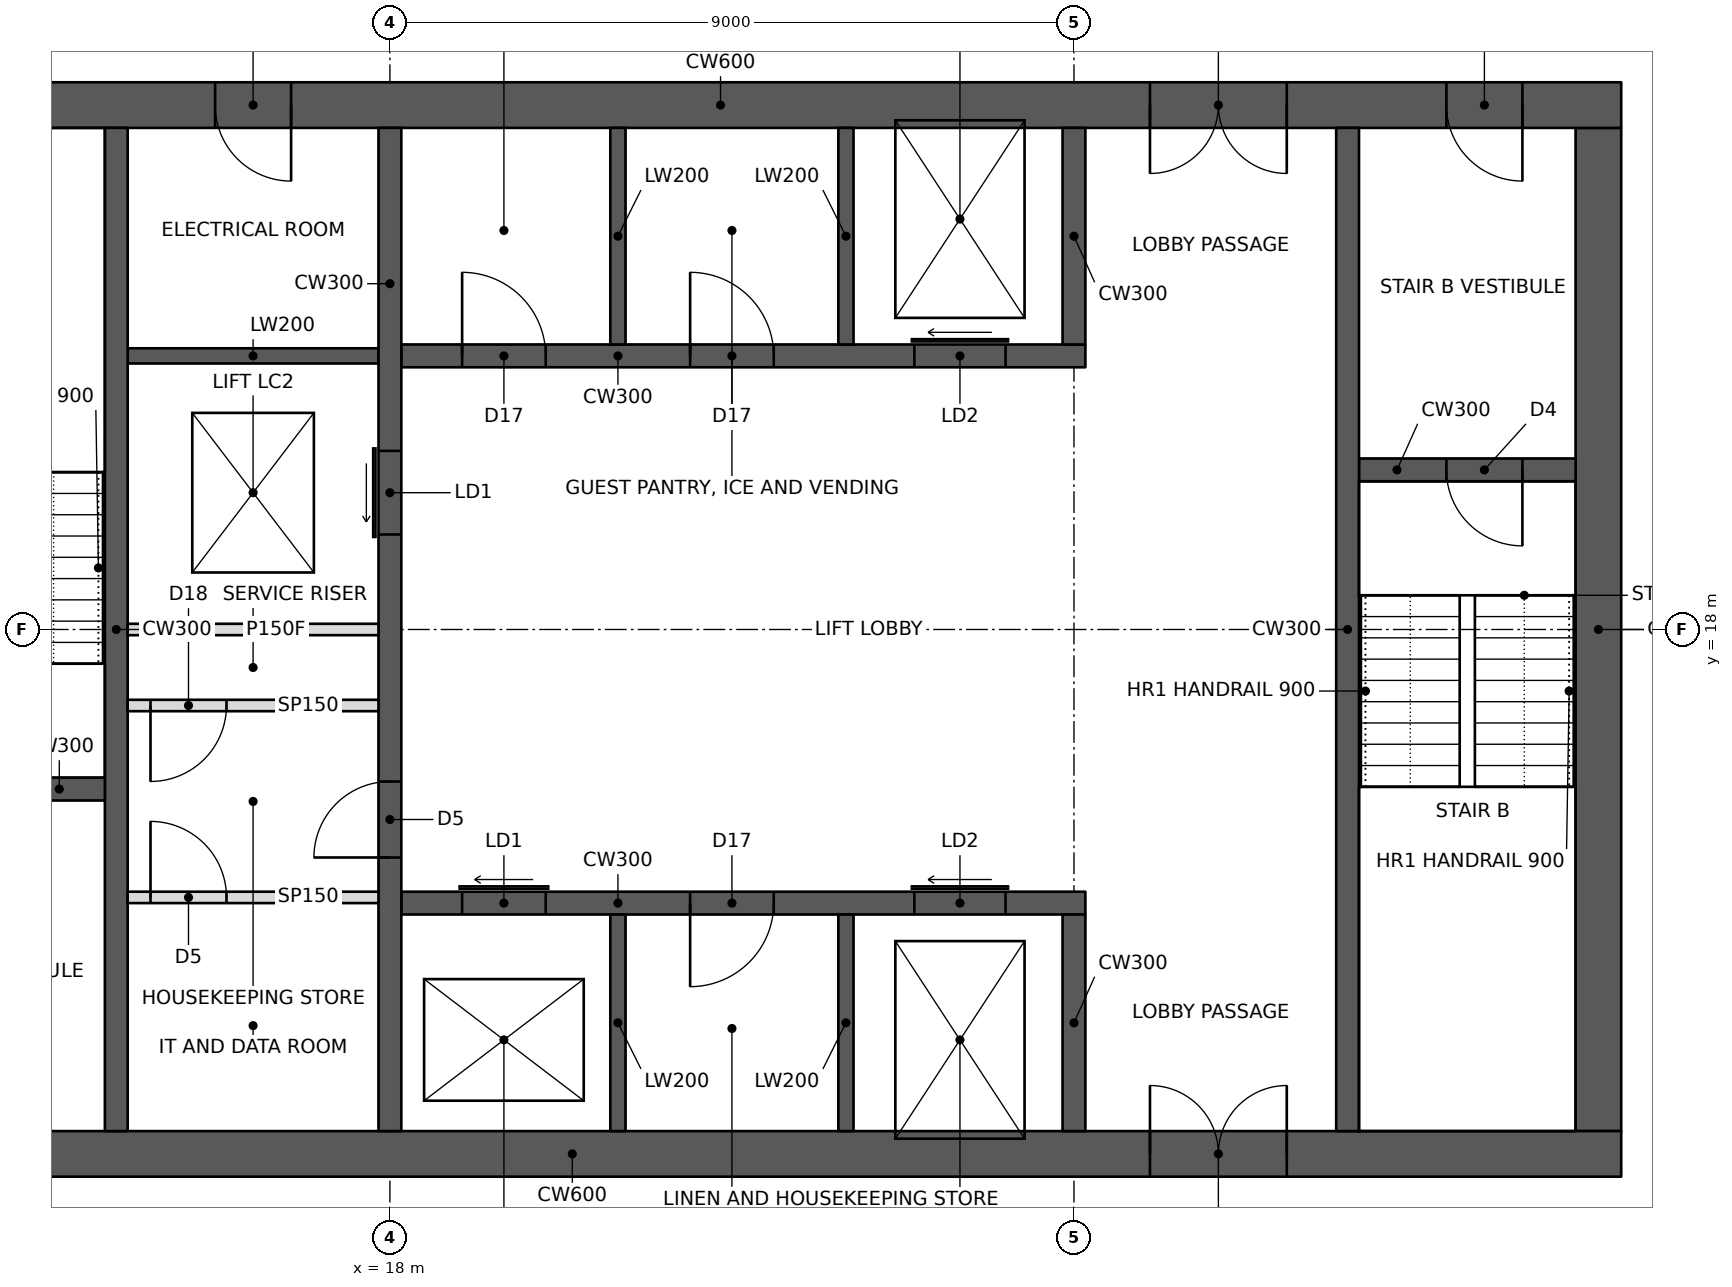
"""IFC4 building model, lengths in metres.
Left out: names, types, materials, properties, quantities, classifications, styles, units other than length and angle.
Written with IfcOpenShell. Run it as: python <this file> out.ifc"""

import sys

from ifc_helpers import new_model, si_unit, direction, frame, frame_2d, origin, place, context, subcontext, project, spatial, rectangle, extrude, element, fill, save


model = new_model("IFC4")
c1 = context("Model", 3, precision=1e-05, world=origin(), true_north=direction((0.0, 1.0)))
c2 = subcontext(c1, "Body", "Model", "MODEL_VIEW")
j1 = project(units=[si_unit("LENGTHUNIT", "METRE"), si_unit("PLANEANGLEUNIT", "RADIAN")], contexts=[c1])
p1 = place(None, origin())
s1 = spatial("IfcSite", under=j1, at=p1, CompositionType="ELEMENT")
p2 = place(p1, origin())
s2 = spatial("IfcBuilding", under=s1, at=p2, CompositionType="ELEMENT")
p3 = place(p2, frame((0.0, 0.0, 197.8)))
s3 = spatial("IfcBuildingStorey", under=s2, at=p3, CompositionType="ELEMENT", Elevation=197.8)
p4 = place(p3, frame((10.8, 11.1, 0.0), z_axis=(0.0, 0.0, 1.0), x_axis=(1.0, 0.0, 0.0)))
e1 = element("IfcWall", 1, at=p4, inside=s3, PredefinedType="SHEAR", context=c2, shape_type="SweptSolid", body=[
    extrude(rectangle(XDim=23.4, YDim=0.6, at=frame_2d((11.7, 0.0))), origin(), (0.0, 0.0, 1.0), 3.4),
])
p5 = place(p4, frame((1.0, 0.0, 0.0)))
e2 = element("IfcOpeningElement", 2, at=p5, cuts=e1, PredefinedType="OPENING", context=c2, shape_type="SweptSolid", body=[
    extrude(rectangle(XDim=1.0, YDim=2.1, at=frame_2d((0.5, 1.05))), frame((0.0, 0.31, 0.0), z_axis=(0.0, -1.0, 0.0), x_axis=(1.0, 0.0, 0.0)), (0.0, 0.0, 1.0), 0.62),
])
p6 = place(p4, frame((17.2, 0.0, 0.0)))
e3 = element("IfcOpeningElement", 3, at=p6, cuts=e1, PredefinedType="OPENING", context=c2, shape_type="SweptSolid", body=[
    extrude(rectangle(XDim=1.8, YDim=2.1, at=frame_2d((0.9, 1.05))), frame((0.0, 0.31, 0.0), z_axis=(0.0, -1.0, 0.0), x_axis=(1.0, 0.0, 0.0)), (0.0, 0.0, 1.0), 0.62),
])
p7 = place(p3, frame((10.8, 24.9, 0.0), z_axis=(0.0, 0.0, 1.0), x_axis=(1.0, 0.0, 0.0)))
e4 = element("IfcWall", 4, at=p7, inside=s3, PredefinedType="SHEAR", context=c2, shape_type="SweptSolid", body=[
    extrude(rectangle(XDim=23.4, YDim=0.6, at=frame_2d((11.7, 0.0))), origin(), (0.0, 0.0, 1.0), 3.4),
])
p8 = place(p7, frame((17.2, 0.0, 0.0)))
e5 = element("IfcOpeningElement", 5, at=p8, cuts=e4, PredefinedType="OPENING", context=c2, shape_type="SweptSolid", body=[
    extrude(rectangle(XDim=1.8, YDim=2.1, at=frame_2d((0.9, 1.05))), frame((0.0, 0.31, 0.0), z_axis=(0.0, -1.0, 0.0), x_axis=(1.0, 0.0, 0.0)), (0.0, 0.0, 1.0), 0.62),
])
p9 = place(p7, frame((21.1, 0.0, 0.0)))
e6 = element("IfcOpeningElement", 6, at=p9, cuts=e4, PredefinedType="OPENING", context=c2, shape_type="SweptSolid", body=[
    extrude(rectangle(XDim=1.0, YDim=2.1, at=frame_2d((0.5, 1.05))), frame((0.0, 0.31, 0.0), z_axis=(0.0, -1.0, 0.0), x_axis=(1.0, 0.0, 0.0)), (0.0, 0.0, 1.0), 0.62),
])
p10 = place(p7, frame((4.9, 0.0, 0.0)))
e7 = element("IfcOpeningElement", 7, at=p10, cuts=e4, PredefinedType="OPENING", context=c2, shape_type="SweptSolid", body=[
    extrude(rectangle(XDim=1.0, YDim=2.1, at=frame_2d((0.5, 1.05))), frame((0.0, 0.31, 0.0), z_axis=(0.0, -1.0, 0.0), x_axis=(1.0, 0.0, 0.0)), (0.0, 0.0, 1.0), 0.62),
])
p11 = place(p3, frame((33.9, 11.4, 0.0), z_axis=(0.0, 0.0, 1.0), x_axis=(0.0, 1.0, 0.0)))
e8 = element("IfcWall", 8, at=p11, inside=s3, PredefinedType="SHEAR", context=c2, shape_type="SweptSolid", body=[
    extrude(rectangle(XDim=13.2, YDim=0.6, at=frame_2d((6.6, 0.0))), origin(), (0.0, 0.0, 1.0), 3.4),
])
p12 = place(p3, frame((14.4, 11.4, 0.0), z_axis=(0.0, 0.0, 1.0), x_axis=(0.0, 1.0, 0.0)))
e9 = element("IfcWall", 9, at=p12, inside=s3, PredefinedType="SHEAR", context=c2, shape_type="SweptSolid", body=[
    extrude(rectangle(XDim=13.2, YDim=0.3, at=frame_2d((6.6, 0.0))), origin(), (0.0, 0.0, 1.0), 3.4),
])
p13 = place(p3, frame((11.4, 15.9, 0.0), z_axis=(0.0, 0.0, 1.0), x_axis=(1.0, 0.0, 0.0)))
e10 = element("IfcWall", 10, at=p13, inside=s3, PredefinedType="SHEAR", context=c2, shape_type="SweptSolid", body=[
    extrude(rectangle(XDim=2.85, YDim=0.3, at=frame_2d((1.425, 0.0))), origin(), (0.0, 0.0, 1.0), 3.4),
])
p14 = place(p13, frame((0.5, 0.0, 0.0)))
e11 = element("IfcOpeningElement", 11, at=p14, cuts=e10, PredefinedType="OPENING", context=c2, shape_type="SweptSolid", body=[
    extrude(rectangle(XDim=1.0, YDim=2.1, at=frame_2d((0.5, 1.05))), frame((0.0, 0.16, 0.0), z_axis=(0.0, -1.0, 0.0), x_axis=(1.0, 0.0, 0.0)), (0.0, 0.0, 1.0), 0.32),
])
p15 = place(p3, frame((18.0, 11.4, 0.0), z_axis=(0.0, 0.0, 1.0), x_axis=(0.0, 1.0, 0.0)))
e12 = element("IfcWall", 12, at=p15, inside=s3, PredefinedType="SHEAR", context=c2, shape_type="SweptSolid", body=[
    extrude(rectangle(XDim=13.2, YDim=0.3, at=frame_2d((6.6, 0.0))), origin(), (0.0, 0.0, 1.0), 3.4),
])
p16 = place(p15, frame((3.6, 0.0, 0.0)))
e13 = element("IfcOpeningElement", 13, at=p16, cuts=e12, PredefinedType="OPENING", context=c2, shape_type="SweptSolid", body=[
    extrude(rectangle(XDim=1.0, YDim=2.1, at=frame_2d((0.5, 1.05))), frame((0.0, 0.16, 0.0), z_axis=(0.0, -1.0, 0.0), x_axis=(1.0, 0.0, 0.0)), (0.0, 0.0, 1.0), 0.32),
])
p17 = place(p15, frame((7.85, 0.0, 0.0)))
e14 = element("IfcOpeningElement", 14, at=p17, cuts=e12, PredefinedType="OPENING", context=c2, shape_type="SweptSolid", body=[
    extrude(rectangle(XDim=1.1, YDim=2.1, at=frame_2d((0.55, 1.05))), frame((0.0, 0.16, 0.0), z_axis=(0.0, -1.0, 0.0), x_axis=(1.0, 0.0, 0.0)), (0.0, 0.0, 1.0), 0.32),
])
p18 = place(p3, frame((14.55, 18.0, 0.0), z_axis=(0.0, 0.0, 1.0), x_axis=(1.0, 0.0, 0.0)))
e15 = element("IfcWall", 15, at=p18, inside=s3, PredefinedType="PARTITIONING", context=c2, shape_type="SweptSolid", body=[
    extrude(rectangle(XDim=3.3, YDim=0.15, at=frame_2d((1.65, 0.0))), origin(), (0.0, 0.0, 1.0), 3.2),
])
p19 = place(p3, frame((18.15, 14.4, 0.0), z_axis=(0.0, 0.0, 1.0), x_axis=(1.0, 0.0, 0.0)))
e16 = element("IfcWall", 16, at=p19, inside=s3, PredefinedType="SHEAR", context=c2, shape_type="SweptSolid", body=[
    extrude(rectangle(XDim=9.0, YDim=0.3, at=frame_2d((4.5, 0.0))), origin(), (0.0, 0.0, 1.0), 3.4),
])
p20 = place(p19, frame((0.8, 0.0, 0.0)))
e17 = element("IfcOpeningElement", 17, at=p20, cuts=e16, PredefinedType="OPENING", context=c2, shape_type="SweptSolid", body=[
    extrude(rectangle(XDim=1.1, YDim=2.1, at=frame_2d((0.55, 1.05))), frame((0.0, 0.16, 0.0), z_axis=(0.0, -1.0, 0.0), x_axis=(1.0, 0.0, 0.0)), (0.0, 0.0, 1.0), 0.32),
])
p21 = place(p19, frame((6.75, 0.0, 0.0)))
e18 = element("IfcOpeningElement", 18, at=p21, cuts=e16, PredefinedType="OPENING", context=c2, shape_type="SweptSolid", body=[
    extrude(rectangle(XDim=1.2, YDim=2.1, at=frame_2d((0.6, 1.05))), frame((0.0, 0.16, 0.0), z_axis=(0.0, -1.0, 0.0), x_axis=(1.0, 0.0, 0.0)), (0.0, 0.0, 1.0), 0.32),
])
p22 = place(p19, frame((3.8, 0.0, 0.0)))
e19 = element("IfcOpeningElement", 19, at=p22, cuts=e16, PredefinedType="OPENING", context=c2, shape_type="SweptSolid", body=[
    extrude(rectangle(XDim=1.1, YDim=2.1, at=frame_2d((0.55, 1.05))), frame((0.0, 0.16, 0.0), z_axis=(0.0, -1.0, 0.0), x_axis=(1.0, 0.0, 0.0)), (0.0, 0.0, 1.0), 0.32),
])
p23 = place(p3, frame((27.0, 11.4, 0.0), z_axis=(0.0, 0.0, 1.0), x_axis=(0.0, 1.0, 0.0)))
e20 = element("IfcWall", 20, at=p23, inside=s3, PredefinedType="SHEAR", context=c2, shape_type="SweptSolid", body=[
    extrude(rectangle(XDim=2.85, YDim=0.3, at=frame_2d((1.425, 0.0))), origin(), (0.0, 0.0, 1.0), 3.4),
])
for number, where, z_axis, x_axis in (
    (21, (21.0, 11.4, 0.0), (0.0, 0.0, 1.0), (0.0, 1.0, 0.0)),
    (22, (24.0, 11.4, 0.0), (0.0, 0.0, 1.0), (0.0, 1.0, 0.0)),
):
    element("IfcWall", number, at=place(p3, frame(where, z_axis=z_axis, x_axis=x_axis)), inside=s3, PredefinedType="SHEAR", context=c2, shape_type="SweptSolid", body=[
        extrude(rectangle(XDim=2.85, YDim=0.2, at=frame_2d((1.425, 0.0))), origin(), (0.0, 0.0, 1.0), 3.4),
    ])
p24 = place(p3, frame((18.15, 21.6, 0.0), z_axis=(0.0, 0.0, 1.0), x_axis=(1.0, 0.0, 0.0)))
e23 = element("IfcWall", 23, at=p24, inside=s3, PredefinedType="SHEAR", context=c2, shape_type="SweptSolid", body=[
    extrude(rectangle(XDim=9.0, YDim=0.3, at=frame_2d((4.5, 0.0))), origin(), (0.0, 0.0, 1.0), 3.4),
])
p25 = place(p24, frame((6.75, 0.0, 0.0)))
e24 = element("IfcOpeningElement", 24, at=p25, cuts=e23, PredefinedType="OPENING", context=c2, shape_type="SweptSolid", body=[
    extrude(rectangle(XDim=1.2, YDim=2.1, at=frame_2d((0.6, 1.05))), frame((0.0, 0.16, 0.0), z_axis=(0.0, -1.0, 0.0), x_axis=(1.0, 0.0, 0.0)), (0.0, 0.0, 1.0), 0.32),
])
p26 = place(p24, frame((0.8, 0.0, 0.0)))
e25 = element("IfcOpeningElement", 25, at=p26, cuts=e23, PredefinedType="OPENING", context=c2, shape_type="SweptSolid", body=[
    extrude(rectangle(XDim=1.1, YDim=2.1, at=frame_2d((0.55, 1.05))), frame((0.0, 0.16, 0.0), z_axis=(0.0, -1.0, 0.0), x_axis=(1.0, 0.0, 0.0)), (0.0, 0.0, 1.0), 0.32),
])
p27 = place(p24, frame((3.8, 0.0, 0.0)))
e26 = element("IfcOpeningElement", 26, at=p27, cuts=e23, PredefinedType="OPENING", context=c2, shape_type="SweptSolid", body=[
    extrude(rectangle(XDim=1.1, YDim=2.1, at=frame_2d((0.55, 1.05))), frame((0.0, 0.16, 0.0), z_axis=(0.0, -1.0, 0.0), x_axis=(1.0, 0.0, 0.0)), (0.0, 0.0, 1.0), 0.32),
])
p28 = place(p3, frame((27.0, 21.75, 0.0), z_axis=(0.0, 0.0, 1.0), x_axis=(0.0, 1.0, 0.0)))
e27 = element("IfcWall", 27, at=p28, inside=s3, PredefinedType="SHEAR", context=c2, shape_type="SweptSolid", body=[
    extrude(rectangle(XDim=2.85, YDim=0.3, at=frame_2d((1.425, 0.0))), origin(), (0.0, 0.0, 1.0), 3.4),
])
for number, where, z_axis, x_axis in (
    (28, (21.0, 21.75, 0.0), (0.0, 0.0, 1.0), (0.0, 1.0, 0.0)),
    (29, (24.0, 21.75, 0.0), (0.0, 0.0, 1.0), (0.0, 1.0, 0.0)),
):
    element("IfcWall", number, at=place(p3, frame(where, z_axis=z_axis, x_axis=x_axis)), inside=s3, PredefinedType="SHEAR", context=c2, shape_type="SweptSolid", body=[
        extrude(rectangle(XDim=2.85, YDim=0.2, at=frame_2d((1.425, 0.0))), origin(), (0.0, 0.0, 1.0), 3.4),
    ])
p29 = place(p3, frame((30.6, 11.4, 0.0), z_axis=(0.0, 0.0, 1.0), x_axis=(0.0, 1.0, 0.0)))
e30 = element("IfcWall", 30, at=p29, inside=s3, PredefinedType="SHEAR", context=c2, shape_type="SweptSolid", body=[
    extrude(rectangle(XDim=13.2, YDim=0.3, at=frame_2d((6.6, 0.0))), origin(), (0.0, 0.0, 1.0), 3.4),
])
p30 = place(p3, frame((30.75, 20.1, 0.0), z_axis=(0.0, 0.0, 1.0), x_axis=(1.0, 0.0, 0.0)))
e31 = element("IfcWall", 31, at=p30, inside=s3, PredefinedType="SHEAR", context=c2, shape_type="SweptSolid", body=[
    extrude(rectangle(XDim=2.85, YDim=0.3, at=frame_2d((1.425, 0.0))), origin(), (0.0, 0.0, 1.0), 3.4),
])
p31 = place(p30, frame((1.15, 0.0, 0.0)))
e32 = element("IfcOpeningElement", 32, at=p31, cuts=e31, PredefinedType="OPENING", context=c2, shape_type="SweptSolid", body=[
    extrude(rectangle(XDim=1.0, YDim=2.1, at=frame_2d((0.5, 1.05))), frame((0.0, 0.16, 0.0), z_axis=(0.0, -1.0, 0.0), x_axis=(1.0, 0.0, 0.0)), (0.0, 0.0, 1.0), 0.32),
])
p32 = place(p3, frame((14.55, 21.6, 0.0), z_axis=(0.0, 0.0, 1.0), x_axis=(1.0, 0.0, 0.0)))
e33 = element("IfcWall", 33, at=p32, inside=s3, PredefinedType="SHEAR", context=c2, shape_type="SweptSolid", body=[
    extrude(rectangle(XDim=3.3, YDim=0.2, at=frame_2d((1.65, 0.0))), origin(), (0.0, 0.0, 1.0), 3.4),
])
p33 = place(p3, frame((14.55, 17.0, 0.0), z_axis=(0.0, 0.0, 1.0), x_axis=(1.0, 0.0, 0.0)))
e34 = element("IfcWall", 34, at=p33, inside=s3, PredefinedType="PARTITIONING", context=c2, shape_type="SweptSolid", body=[
    extrude(rectangle(XDim=3.3, YDim=0.15, at=frame_2d((1.65, 0.0))), origin(), (0.0, 0.0, 1.0), 3.2),
])
p34 = place(p33, frame((0.3, 0.0, 0.0)))
e35 = element("IfcOpeningElement", 35, at=p34, cuts=e34, PredefinedType="OPENING", context=c2, shape_type="SweptSolid", body=[
    extrude(rectangle(XDim=1.0, YDim=2.1, at=frame_2d((0.5, 1.05))), frame((0.0, 0.085, 0.0), z_axis=(0.0, -1.0, 0.0), x_axis=(1.0, 0.0, 0.0)), (0.0, 0.0, 1.0), 0.17),
])
p35 = place(p3, frame((14.55, 14.475, 0.0), z_axis=(0.0, 0.0, 1.0), x_axis=(1.0, 0.0, 0.0)))
e36 = element("IfcWall", 36, at=p35, inside=s3, PredefinedType="PARTITIONING", context=c2, shape_type="SweptSolid", body=[
    extrude(rectangle(XDim=3.3, YDim=0.15, at=frame_2d((1.65, 0.0))), origin(), (0.0, 0.0, 1.0), 3.2),
])
p36 = place(p35, frame((0.3, 0.0, 0.0)))
e37 = element("IfcOpeningElement", 37, at=p36, cuts=e36, PredefinedType="OPENING", context=c2, shape_type="SweptSolid", body=[
    extrude(rectangle(XDim=1.0, YDim=2.1, at=frame_2d((0.5, 1.05))), frame((0.0, 0.085, 0.0), z_axis=(0.0, -1.0, 0.0), x_axis=(1.0, 0.0, 0.0)), (0.0, 0.0, 1.0), 0.17),
])
p37 = place(p34, frame((1.0, 0.0, 0.0), z_axis=(0.0, 0.0, 1.0), x_axis=(-1.0, 0.0, 0.0)))
e38 = element("IfcDoor", 38, at=p37, inside=s3, OperationType="SINGLE_SWING_RIGHT", PredefinedType="DOOR", context=c2, shape_type="SweptSolid", body=[
    extrude(rectangle(XDim=1.0, YDim=2.1, at=frame_2d((0.5, 1.05))), frame((0.0, 0.025, 0.0), z_axis=(0.0, -1.0, 0.0), x_axis=(1.0, 0.0, 0.0)), (0.0, 0.0, 1.0), 0.05),
])
fill(e35, e38)
p38 = place(p36, origin())
e39 = element("IfcDoor", 39, at=p38, inside=s3, OperationType="SINGLE_SWING_LEFT", PredefinedType="DOOR", context=c2, shape_type="SweptSolid", body=[
    extrude(rectangle(XDim=1.0, YDim=2.1, at=frame_2d((0.5, 1.05))), frame((0.0, 0.025, 0.0), z_axis=(0.0, -1.0, 0.0), x_axis=(1.0, 0.0, 0.0)), (0.0, 0.0, 1.0), 0.05),
])
fill(e37, e39)
p39 = place(p6, origin())
e40 = element("IfcDoor", 40, at=p39, inside=s3, OperationType="DOUBLE_DOOR_SINGLE_SWING", PredefinedType="DOOR", context=c2, shape_type="SweptSolid", body=[
    extrude(rectangle(XDim=1.8, YDim=2.1, at=frame_2d((0.9, 1.05))), frame((0.0, 0.025, 0.0), z_axis=(0.0, -1.0, 0.0), x_axis=(1.0, 0.0, 0.0)), (0.0, 0.0, 1.0), 0.05),
])
fill(e3, e40)
p40 = place(p8, frame((1.8, 0.0, 0.0), z_axis=(0.0, 0.0, 1.0), x_axis=(-1.0, 0.0, 0.0)))
e41 = element("IfcDoor", 41, at=p40, inside=s3, OperationType="DOUBLE_DOOR_SINGLE_SWING", PredefinedType="DOOR", context=c2, shape_type="SweptSolid", body=[
    extrude(rectangle(XDim=1.8, YDim=2.1, at=frame_2d((0.9, 1.05))), frame((0.0, 0.025, 0.0), z_axis=(0.0, -1.0, 0.0), x_axis=(1.0, 0.0, 0.0)), (0.0, 0.0, 1.0), 0.05),
])
fill(e5, e41)
p41 = place(p9, frame((1.0, 0.0, 0.0), z_axis=(0.0, 0.0, 1.0), x_axis=(-1.0, 0.0, 0.0)))
e42 = element("IfcDoor", 42, at=p41, inside=s3, OperationType="SINGLE_SWING_LEFT", PredefinedType="DOOR", context=c2, shape_type="SweptSolid", body=[
    extrude(rectangle(XDim=1.0, YDim=2.1, at=frame_2d((0.5, 1.05))), frame((0.0, 0.025, 0.0), z_axis=(0.0, -1.0, 0.0), x_axis=(1.0, 0.0, 0.0)), (0.0, 0.0, 1.0), 0.05),
])
fill(e6, e42)
p42 = place(p31, frame((1.0, 0.0, 0.0), z_axis=(0.0, 0.0, 1.0), x_axis=(-1.0, 0.0, 0.0)))
e43 = element("IfcDoor", 43, at=p42, inside=s3, OperationType="SINGLE_SWING_LEFT", PredefinedType="DOOR", context=c2, shape_type="SweptSolid", body=[
    extrude(rectangle(XDim=1.0, YDim=2.1, at=frame_2d((0.5, 1.05))), frame((0.0, 0.025, 0.0), z_axis=(0.0, -1.0, 0.0), x_axis=(1.0, 0.0, 0.0)), (0.0, 0.0, 1.0), 0.05),
])
fill(e32, e43)
p43 = place(p16, origin())
e44 = element("IfcDoor", 44, at=p43, inside=s3, OperationType="SINGLE_SWING_LEFT", PredefinedType="DOOR", context=c2, shape_type="SweptSolid", body=[
    extrude(rectangle(XDim=1.0, YDim=2.1, at=frame_2d((0.5, 1.05))), frame((0.0, 0.025, 0.0), z_axis=(0.0, -1.0, 0.0), x_axis=(1.0, 0.0, 0.0)), (0.0, 0.0, 1.0), 0.05),
])
fill(e13, e44)
p44 = place(p10, frame((1.0, 0.0, 0.0), z_axis=(0.0, 0.0, 1.0), x_axis=(-1.0, 0.0, 0.0)))
e45 = element("IfcDoor", 45, at=p44, inside=s3, OperationType="SINGLE_SWING_LEFT", PredefinedType="DOOR", context=c2, shape_type="SweptSolid", body=[
    extrude(rectangle(XDim=1.0, YDim=2.1, at=frame_2d((0.5, 1.05))), frame((0.0, 0.025, 0.0), z_axis=(0.0, -1.0, 0.0), x_axis=(1.0, 0.0, 0.0)), (0.0, 0.0, 1.0), 0.05),
])
fill(e7, e45)
p45 = place(p20, origin())
e46 = element("IfcDoor", 46, at=p45, inside=s3, OperationType="SLIDING_TO_LEFT", PredefinedType="DOOR", context=c2, shape_type="SweptSolid", body=[
    extrude(rectangle(XDim=1.1, YDim=2.1, at=frame_2d((0.55, 1.05))), frame((0.0, 0.025, 0.0), z_axis=(0.0, -1.0, 0.0), x_axis=(1.0, 0.0, 0.0)), (0.0, 0.0, 1.0), 0.05),
])
fill(e17, e46)
p46 = place(p17, origin())
e47 = element("IfcDoor", 47, at=p46, inside=s3, OperationType="SLIDING_TO_LEFT", PredefinedType="DOOR", context=c2, shape_type="SweptSolid", body=[
    extrude(rectangle(XDim=1.1, YDim=2.1, at=frame_2d((0.55, 1.05))), frame((0.0, 0.025, 0.0), z_axis=(0.0, -1.0, 0.0), x_axis=(1.0, 0.0, 0.0)), (0.0, 0.0, 1.0), 0.05),
])
fill(e14, e47)
p47 = place(p21, origin())
e48 = element("IfcDoor", 48, at=p47, inside=s3, OperationType="SLIDING_TO_LEFT", PredefinedType="DOOR", context=c2, shape_type="SweptSolid", body=[
    extrude(rectangle(XDim=1.2, YDim=2.1, at=frame_2d((0.6, 1.05))), frame((0.0, 0.025, 0.0), z_axis=(0.0, -1.0, 0.0), x_axis=(1.0, 0.0, 0.0)), (0.0, 0.0, 1.0), 0.05),
])
fill(e18, e48)
p48 = place(p25, origin())
e49 = element("IfcDoor", 49, at=p48, inside=s3, OperationType="SLIDING_TO_LEFT", PredefinedType="DOOR", context=c2, shape_type="SweptSolid", body=[
    extrude(rectangle(XDim=1.2, YDim=2.1, at=frame_2d((0.6, 1.05))), frame((0.0, 0.025, 0.0), z_axis=(0.0, -1.0, 0.0), x_axis=(1.0, 0.0, 0.0)), (0.0, 0.0, 1.0), 0.05),
])
fill(e24, e49)
p49 = place(p26, origin())
e50 = element("IfcDoor", 50, at=p49, inside=s3, OperationType="SINGLE_SWING_LEFT", PredefinedType="DOOR", context=c2, shape_type="SweptSolid", body=[
    extrude(rectangle(XDim=1.1, YDim=2.1, at=frame_2d((0.55, 1.05))), frame((0.0, 0.025, 0.0), z_axis=(0.0, -1.0, 0.0), x_axis=(1.0, 0.0, 0.0)), (0.0, 0.0, 1.0), 0.05),
])
fill(e25, e50)
p50 = place(p27, origin())
e51 = element("IfcDoor", 51, at=p50, inside=s3, OperationType="SINGLE_SWING_LEFT", PredefinedType="DOOR", context=c2, shape_type="SweptSolid", body=[
    extrude(rectangle(XDim=1.1, YDim=2.1, at=frame_2d((0.55, 1.05))), frame((0.0, 0.025, 0.0), z_axis=(0.0, -1.0, 0.0), x_axis=(1.0, 0.0, 0.0)), (0.0, 0.0, 1.0), 0.05),
])
fill(e26, e51)
p51 = place(p22, frame((1.1, 0.0, 0.0), z_axis=(0.0, 0.0, 1.0), x_axis=(-1.0, 0.0, 0.0)))
e52 = element("IfcDoor", 52, at=p51, inside=s3, OperationType="SINGLE_SWING_RIGHT", PredefinedType="DOOR", context=c2, shape_type="SweptSolid", body=[
    extrude(rectangle(XDim=1.1, YDim=2.1, at=frame_2d((0.55, 1.05))), frame((0.0, 0.025, 0.0), z_axis=(0.0, -1.0, 0.0), x_axis=(1.0, 0.0, 0.0)), (0.0, 0.0, 1.0), 0.05),
])
fill(e19, e52)
save(model, sys.argv[1])
